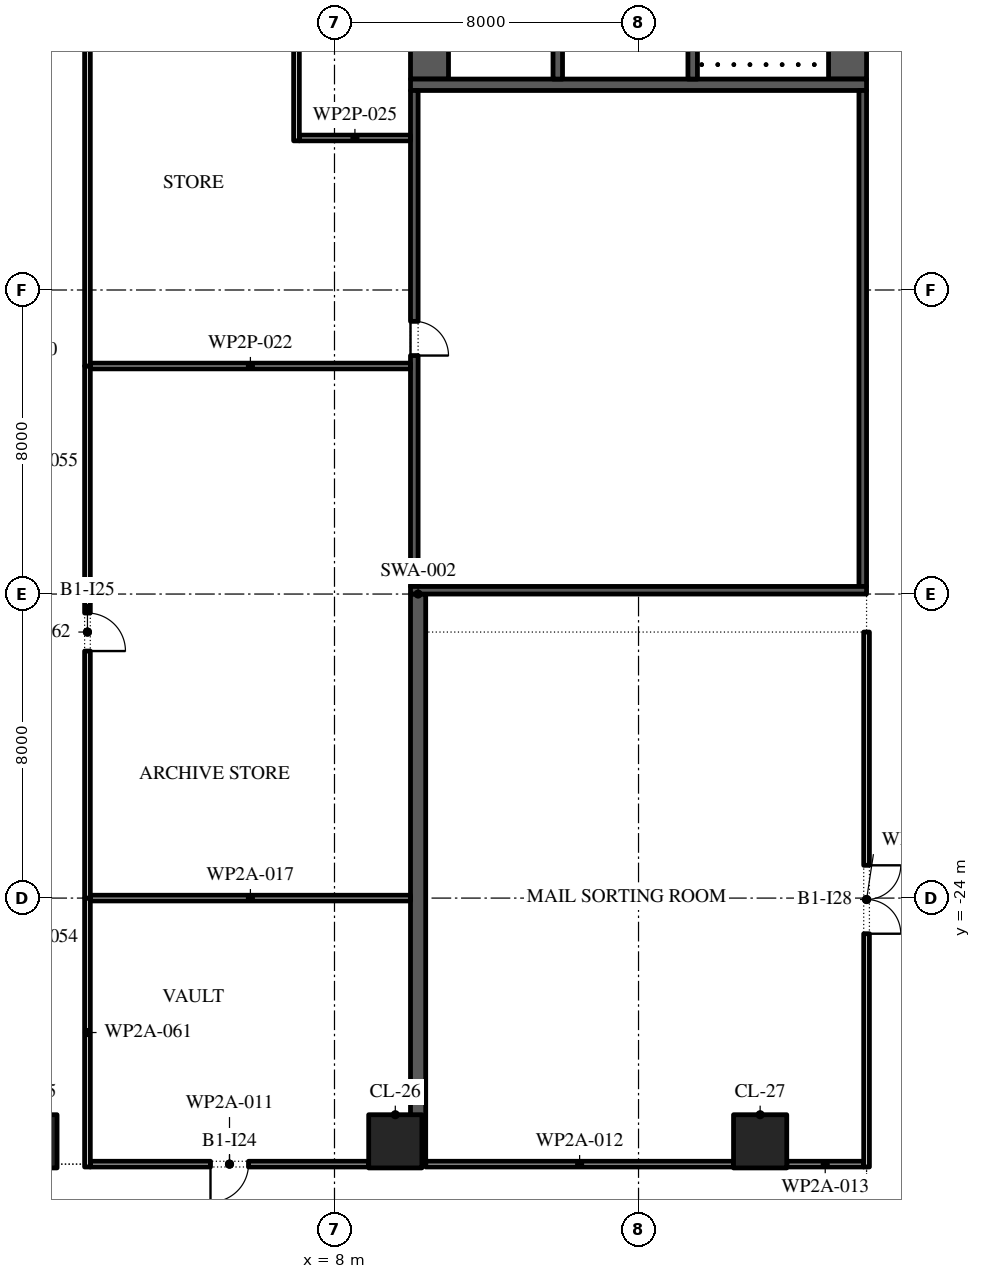
"""IFC4 building model, lengths in metres.
Left out: names, types, materials, properties, quantities, classifications, styles, units other than length and angle.
Written with IfcOpenShell. Run it as: python <this file> out.ifc"""

import sys

from ifc_helpers import new_model, si_unit, direction, frame, frame_2d, origin, origin_2d, place, context, subcontext, project, spatial, rectangle, extrude, element, fill, save


model = new_model("IFC4")
c1 = context("Model", 3, precision=1e-05, world=origin(), true_north=direction((0.0, 1.0)))
c2 = subcontext(c1, "Body", "Model", "MODEL_VIEW")
j1 = project(units=[si_unit("LENGTHUNIT", "METRE"), si_unit("PLANEANGLEUNIT", "RADIAN")], contexts=[c1])
p1 = place(None, origin())
s1 = spatial("IfcSite", under=j1, at=p1, CompositionType="ELEMENT")
p2 = place(p1, origin())
s2 = spatial("IfcBuilding", under=s1, at=p2, CompositionType="ELEMENT")
p3 = place(p2, frame((0.0, 0.0, -5.2)))
s3 = spatial("IfcBuildingStorey", under=s2, at=p3, CompositionType="ELEMENT", Elevation=-5.2)
for number, where, z_axis, x_axis in (
    (1, (0.0, -30.4, 0.0), (0.0, 0.0, 1.0), (1.0, 0.0, 0.0)),
    (2, (9.6, -30.4, 0.0), (0.0, 0.0, 1.0), (1.0, 0.0, 0.0)),
    (3, (19.2, -30.4, 0.0), (0.0, 0.0, 1.0), (1.0, 0.0, 0.0)),
):
    element("IfcColumn", number, at=place(p3, frame(where, z_axis=z_axis, x_axis=x_axis)), inside=s3, PredefinedType="COLUMN", context=c2, shape_type="SweptSolid", body=[
        extrude(rectangle(XDim=1.4, YDim=1.4, at=origin_2d()), origin(), (0.0, 0.0, 1.0), 5.2),
    ])
p4 = place(p3, frame((10.2, -31.0, 0.0), z_axis=(0.0, 0.0, 1.0), x_axis=(0.0, 1.0, 0.0)))
e4 = element("IfcWall", 4, at=p4, inside=s3, PredefinedType="SHEAR", context=c2, shape_type="SweptSolid", body=[
    extrude(rectangle(XDim=15.0, YDim=0.4, at=frame_2d((7.5, 0.0))), origin(), (0.0, 0.0, 1.0), 4.9),
])
p5 = place(p3, frame((21.5, -2.45, 0.0), z_axis=(0.0, 0.0, 1.0), x_axis=(0.0, 1.0, 0.0)))
e5 = element("IfcWall", 5, at=p5, inside=s3, PredefinedType="SHEAR", context=c2, shape_type="SweptSolid", body=[
    extrude(rectangle(XDim=27.9, YDim=1.0, at=frame_2d((13.95, 0.0))), origin(), (0.0, 0.0, 1.0), 4.9),
])
p6 = place(p5, frame((5.05, 0.0, 0.0)))
e6 = element("IfcOpeningElement", 6, at=p6, cuts=e5, PredefinedType="OPENING", context=c2, shape_type="SweptSolid", body=[
    extrude(rectangle(XDim=1.2, YDim=2.1, at=frame_2d((0.6, 1.05))), frame((0.0, 0.51, 0.0), z_axis=(0.0, -1.0, 0.0), x_axis=(1.0, 0.0, 0.0)), (0.0, 0.0, 1.0), 1.02),
])
p7 = place(p5, frame((21.65, 0.0, 0.0)))
e7 = element("IfcOpeningElement", 7, at=p7, cuts=e5, PredefinedType="OPENING", context=c2, shape_type="SweptSolid", body=[
    extrude(rectangle(XDim=1.2, YDim=2.1, at=frame_2d((0.6, 1.05))), frame((0.0, 0.51, 0.0), z_axis=(0.0, -1.0, 0.0), x_axis=(1.0, 0.0, 0.0)), (0.0, 0.0, 1.0), 1.02),
])
p8 = place(p3, frame((10.5, -2.45, 0.0), z_axis=(0.0, 0.0, 1.0), x_axis=(0.0, 1.0, 0.0)))
e8 = element("IfcWall", 8, at=p8, inside=s3, PredefinedType="SHEAR", context=c2, shape_type="SweptSolid", body=[
    extrude(rectangle(XDim=27.9, YDim=1.0, at=frame_2d((13.95, 0.0))), origin(), (0.0, 0.0, 1.0), 4.9),
])
p9 = place(p8, frame((23.65, 0.0, 0.0)))
e9 = element("IfcOpeningElement", 9, at=p9, cuts=e8, PredefinedType="OPENING", context=c2, shape_type="SweptSolid", body=[
    extrude(rectangle(XDim=2.4, YDim=2.1, at=frame_2d((1.2, 1.05))), frame((0.0, 0.51, 0.0), z_axis=(0.0, -1.0, 0.0), x_axis=(1.0, 0.0, 0.0)), (0.0, 0.0, 1.0), 1.02),
])
p10 = place(p8, frame((1.387, 0.0, 0.0)))
e10 = element("IfcOpeningElement", 10, at=p10, cuts=e8, PredefinedType="OPENING", context=c2, shape_type="SweptSolid", body=[
    extrude(rectangle(XDim=0.9, YDim=2.1, at=frame_2d((0.45, 1.05))), frame((0.0, 0.51, 0.0), z_axis=(0.0, -1.0, 0.0), x_axis=(1.0, 0.0, 0.0)), (0.0, 0.0, 1.0), 1.02),
])
p11 = place(p8, frame((4.562, 0.0, 0.0)))
e11 = element("IfcOpeningElement", 11, at=p11, cuts=e8, PredefinedType="OPENING", context=c2, shape_type="SweptSolid", body=[
    extrude(rectangle(XDim=1.0, YDim=2.1, at=frame_2d((0.5, 1.05))), frame((0.0, 0.51, 0.0), z_axis=(0.0, -1.0, 0.0), x_axis=(1.0, 0.0, 0.0)), (0.0, 0.0, 1.0), 1.02),
])
p12 = place(p3, frame((10.0, -2.6, 0.0), z_axis=(0.0, 0.0, 1.0), x_axis=(1.0, 0.0, 0.0)))
e12 = element("IfcWall", 12, at=p12, inside=s3, PredefinedType="SHEAR", context=c2, shape_type="SweptSolid", body=[
    extrude(rectangle(XDim=12.0, YDim=0.3, at=frame_2d((6.0, 0.0))), origin(), (0.0, 0.0, 1.0), 4.9),
])
p13 = place(p3, frame((17.425, -2.45, 0.0), z_axis=(0.0, 0.0, 1.0), x_axis=(0.0, 1.0, 0.0)))
e13 = element("IfcWall", 13, at=p13, inside=s3, PredefinedType="SHEAR", context=c2, shape_type="SweptSolid", body=[
    extrude(rectangle(XDim=6.3, YDim=0.25, at=frame_2d((3.15, 0.0))), origin(), (0.0, 0.0, 1.0), 4.9),
])
p14 = place(p13, frame((5.05, 0.0, 0.0)))
e14 = element("IfcOpeningElement", 14, at=p14, cuts=e13, PredefinedType="OPENING", context=c2, shape_type="SweptSolid", body=[
    extrude(rectangle(XDim=1.2, YDim=2.1, at=frame_2d((0.6, 1.05))), frame((0.0, 0.135, 0.0), z_axis=(0.0, -1.0, 0.0), x_axis=(1.0, 0.0, 0.0)), (0.0, 0.0, 1.0), 0.27),
])
p15 = place(p3, frame((13.875, -2.45, 0.0), z_axis=(0.0, 0.0, 1.0), x_axis=(0.0, 1.0, 0.0)))
e15 = element("IfcWall", 15, at=p15, inside=s3, PredefinedType="SHEAR", context=c2, shape_type="SweptSolid", body=[
    extrude(rectangle(XDim=21.3, YDim=0.25, at=frame_2d((10.65, 0.0))), origin(), (0.0, 0.0, 1.0), 4.9),
])
p16 = place(p15, frame((10.996, 0.0, 0.0)))
e16 = element("IfcOpeningElement", 16, at=p16, cuts=e15, PredefinedType="OPENING", context=c2, shape_type="SweptSolid", body=[
    extrude(rectangle(XDim=1.8, YDim=2.4, at=frame_2d((0.9, 1.2))), frame((0.0, 0.135, 0.0), z_axis=(0.0, -1.0, 0.0), x_axis=(1.0, 0.0, 0.0)), (0.0, 0.0, 1.0), 0.27),
])
p17 = place(p15, frame((17.725, 0.0, 0.0)))
e17 = element("IfcOpeningElement", 17, at=p17, cuts=e15, PredefinedType="OPENING", context=c2, shape_type="SweptSolid", body=[
    extrude(rectangle(XDim=0.9, YDim=2.1, at=frame_2d((0.45, 1.05))), frame((0.0, 0.135, 0.0), z_axis=(0.0, -1.0, 0.0), x_axis=(1.0, 0.0, 0.0)), (0.0, 0.0, 1.0), 0.27),
])
p18 = place(p15, frame((6.971, 0.0, 0.0)))
e18 = element("IfcOpeningElement", 18, at=p18, cuts=e15, PredefinedType="OPENING", context=c2, shape_type="SweptSolid", body=[
    extrude(rectangle(XDim=1.1, YDim=2.1, at=frame_2d((0.55, 1.05))), frame((0.0, 0.135, 0.0), z_axis=(0.0, -1.0, 0.0), x_axis=(1.0, 0.0, 0.0)), (0.0, 0.0, 1.0), 0.27),
])
p19 = place(p3, frame((21.9, -15.8, 0.0), z_axis=(0.0, 0.0, 1.0), x_axis=(0.0, 1.0, 0.0)))
e19 = element("IfcWall", 19, at=p19, inside=s3, PredefinedType="SHEAR", context=c2, shape_type="SweptSolid", body=[
    extrude(rectangle(XDim=13.05, YDim=0.2, at=frame_2d((6.525, 0.0))), origin(), (0.0, 0.0, 1.0), 4.9),
])
p20 = place(p3, frame((10.1, -15.8, 0.0), z_axis=(0.0, 0.0, 1.0), x_axis=(0.0, 1.0, 0.0)))
e20 = element("IfcWall", 20, at=p20, inside=s3, PredefinedType="SHEAR", context=c2, shape_type="SweptSolid", body=[
    extrude(rectangle(XDim=13.05, YDim=0.2, at=frame_2d((6.525, 0.0))), origin(), (0.0, 0.0, 1.0), 4.9),
])
p21 = place(p20, frame((6.075, 0.0, 0.0)))
e21 = element("IfcOpeningElement", 21, at=p21, cuts=e20, PredefinedType="OPENING", context=c2, shape_type="SweptSolid", body=[
    extrude(rectangle(XDim=0.9, YDim=2.1, at=frame_2d((0.45, 1.05))), frame((0.0, 0.11, 0.0), z_axis=(0.0, -1.0, 0.0), x_axis=(1.0, 0.0, 0.0)), (0.0, 0.0, 1.0), 0.22),
])
p22 = place(p3, frame((10.0, -15.9, 0.0), z_axis=(0.0, 0.0, 1.0), x_axis=(1.0, 0.0, 0.0)))
e22 = element("IfcWall", 22, at=p22, inside=s3, PredefinedType="SHEAR", context=c2, shape_type="SweptSolid", body=[
    extrude(rectangle(XDim=12.0, YDim=0.2, at=frame_2d((6.0, 0.0))), origin(), (0.0, 0.0, 1.0), 4.9),
])
p23 = place(p3, frame((1.575, -31.0, 0.0), z_axis=(0.0, 0.0, 1.0), x_axis=(1.0, 0.0, 0.0)))
e23 = element("IfcWall", 23, at=p23, inside=s3, PredefinedType="PARTITIONING", context=c2, shape_type="SweptSolid", body=[
    extrude(rectangle(XDim=7.325, YDim=0.15, at=frame_2d((3.663, 0.0))), origin(), (0.0, 0.0, 1.0), 4.9),
])
p24 = place(p23, frame((3.163, 0.0, 0.0)))
e24 = element("IfcOpeningElement", 24, at=p24, cuts=e23, PredefinedType="OPENING", context=c2, shape_type="SweptSolid", body=[
    extrude(rectangle(XDim=1.0, YDim=2.1, at=frame_2d((0.5, 1.05))), frame((0.0, 0.085, 0.0), z_axis=(0.0, -1.0, 0.0), x_axis=(1.0, 0.0, 0.0)), (0.0, 0.0, 1.0), 0.17),
])
p25 = place(p3, frame((10.4, -31.0, 0.0), z_axis=(0.0, 0.0, 1.0), x_axis=(1.0, 0.0, 0.0)))
e25 = element("IfcWall", 25, at=p25, inside=s3, PredefinedType="PARTITIONING", context=c2, shape_type="SweptSolid", body=[
    extrude(rectangle(XDim=8.1, YDim=0.15, at=frame_2d((4.05, 0.0))), origin(), (0.0, 0.0, 1.0), 4.9),
])
p26 = place(p3, frame((19.9, -31.0, 0.0), z_axis=(0.0, 0.0, 1.0), x_axis=(1.0, 0.0, 0.0)))
e26 = element("IfcWall", 26, at=p26, inside=s3, PredefinedType="PARTITIONING", context=c2, shape_type="SweptSolid", body=[
    extrude(rectangle(XDim=2.025, YDim=0.15, at=frame_2d((1.013, 0.0))), origin(), (0.0, 0.0, 1.0), 4.9),
])
p27 = place(p3, frame((1.575, -24.0, 0.0), z_axis=(0.0, 0.0, 1.0), x_axis=(1.0, 0.0, 0.0)))
e27 = element("IfcWall", 27, at=p27, inside=s3, PredefinedType="PARTITIONING", context=c2, shape_type="SweptSolid", body=[
    extrude(rectangle(XDim=8.425, YDim=0.15, at=frame_2d((4.212, 0.0))), origin(), (0.0, 0.0, 1.0), 4.9),
])
p28 = place(p3, frame((1.575, -10.0, 0.0), z_axis=(0.0, 0.0, 1.0), x_axis=(1.0, 0.0, 0.0)))
e28 = element("IfcWall", 28, at=p28, inside=s3, PredefinedType="PARTITIONING", context=c2, shape_type="SweptSolid", body=[
    extrude(rectangle(XDim=8.425, YDim=0.15, at=frame_2d((4.212, 0.0))), origin(), (0.0, 0.0, 1.0), 3.93),
])
p29 = place(p3, frame((7.075, -4.0, 0.0), z_axis=(0.0, 0.0, 1.0), x_axis=(1.0, 0.0, 0.0)))
e29 = element("IfcWall", 29, at=p29, inside=s3, PredefinedType="PARTITIONING", context=c2, shape_type="SweptSolid", body=[
    extrude(rectangle(XDim=2.925, YDim=0.15, at=frame_2d((1.462, 0.0))), origin(), (0.0, 0.0, 1.0), 3.93),
])
p30 = place(p3, frame((1.5, -31.075, 0.0), z_axis=(0.0, 0.0, 1.0), x_axis=(0.0, 1.0, 0.0)))
e30 = element("IfcWall", 30, at=p30, inside=s3, PredefinedType="PARTITIONING", context=c2, shape_type="SweptSolid", body=[
    extrude(rectangle(XDim=7.075, YDim=0.15, at=frame_2d((3.538, 0.0))), origin(), (0.0, 0.0, 1.0), 4.9),
])
p31 = place(p3, frame((1.5, -24.0, 0.0), z_axis=(0.0, 0.0, 1.0), x_axis=(0.0, 1.0, 0.0)))
e31 = element("IfcWall", 31, at=p31, inside=s3, PredefinedType="PARTITIONING", context=c2, shape_type="SweptSolid", body=[
    extrude(rectangle(XDim=14.0, YDim=0.15, at=frame_2d((7.0, 0.0))), origin(), (0.0, 0.0, 1.0), 4.9),
])
p32 = place(p31, frame((6.5, 0.0, 0.0)))
e32 = element("IfcOpeningElement", 32, at=p32, cuts=e31, PredefinedType="OPENING", context=c2, shape_type="SweptSolid", body=[
    extrude(rectangle(XDim=1.0, YDim=2.1, at=frame_2d((0.5, 1.05))), frame((0.0, 0.085, 0.0), z_axis=(0.0, -1.0, 0.0), x_axis=(1.0, 0.0, 0.0)), (0.0, 0.0, 1.0), 0.17),
])
p33 = place(p3, frame((1.5, -10.0, 0.0), z_axis=(0.0, 0.0, 1.0), x_axis=(0.0, 1.0, 0.0)))
e33 = element("IfcWall", 33, at=p33, inside=s3, PredefinedType="PARTITIONING", context=c2, shape_type="SweptSolid", body=[
    extrude(rectangle(XDim=35.475, YDim=0.15, at=frame_2d((17.738, 0.0))), origin(), (0.0, 0.0, 1.0), 4.9),
])
p34 = place(p33, frame((16.837, 0.0, 0.0)))
e34 = element("IfcOpeningElement", 34, at=p34, cuts=e33, PredefinedType="OPENING", context=c2, shape_type="SweptSolid", body=[
    extrude(rectangle(XDim=1.8, YDim=2.1, at=frame_2d((0.9, 1.05))), frame((0.0, 0.085, 0.0), z_axis=(0.0, -1.0, 0.0), x_axis=(1.0, 0.0, 0.0)), (0.0, 0.0, 1.0), 0.17),
])
p35 = place(p3, frame((7.0, -4.075, 0.0), z_axis=(0.0, 0.0, 1.0), x_axis=(0.0, 1.0, 0.0)))
e35 = element("IfcWall", 35, at=p35, inside=s3, PredefinedType="PARTITIONING", context=c2, shape_type="SweptSolid", body=[
    extrude(rectangle(XDim=29.55, YDim=0.15, at=frame_2d((14.775, 0.0))), origin(), (0.0, 0.0, 1.0), 4.9),
])
p36 = place(p3, frame((22.0, -31.075, 0.0), z_axis=(0.0, 0.0, 1.0), x_axis=(0.0, 1.0, 0.0)))
e36 = element("IfcWall", 36, at=p36, inside=s3, PredefinedType="PARTITIONING", context=c2, shape_type="SweptSolid", body=[
    extrude(rectangle(XDim=14.075, YDim=0.15, at=frame_2d((7.038, 0.0))), origin(), (0.0, 0.0, 1.0), 4.9),
])
p37 = place(p36, frame((6.137, 0.0, 0.0)))
e37 = element("IfcOpeningElement", 37, at=p37, cuts=e36, PredefinedType="OPENING", context=c2, shape_type="SweptSolid", body=[
    extrude(rectangle(XDim=1.8, YDim=2.1, at=frame_2d((0.9, 1.05))), frame((0.0, 0.085, 0.0), z_axis=(0.0, -1.0, 0.0), x_axis=(1.0, 0.0, 0.0)), (0.0, 0.0, 1.0), 0.17),
])
p38 = place(p21, frame((0.9, -0.15, 0.0), z_axis=(0.0, 0.0, 1.0), x_axis=(-1.0, 0.0, 0.0)))
e38 = element("IfcDoor", 38, at=p38, inside=s3, OperationType="SINGLE_SWING_LEFT", PredefinedType="DOOR", context=c2, shape_type="SweptSolid", body=[
    extrude(rectangle(XDim=0.9, YDim=2.1, at=frame_2d((0.45, 1.05))), frame((0.0, -0.05, 0.0), z_axis=(0.0, -1.0, 0.0), x_axis=(1.0, 0.0, 0.0)), (0.0, 0.0, 1.0), 0.05),
])
fill(e21, e38)
p39 = place(p24, frame((1.0, 0.0, 0.0), z_axis=(0.0, 0.0, 1.0), x_axis=(-1.0, 0.0, 0.0)))
e39 = element("IfcDoor", 39, at=p39, inside=s3, OperationType="SINGLE_SWING_LEFT", PredefinedType="DOOR", context=c2, shape_type="SweptSolid", body=[
    extrude(rectangle(XDim=1.0, YDim=2.1, at=frame_2d((0.5, 1.05))), frame((0.0, 0.025, 0.0), z_axis=(0.0, -1.0, 0.0), x_axis=(1.0, 0.0, 0.0)), (0.0, 0.0, 1.0), 0.05),
])
fill(e24, e39)
p40 = place(p32, frame((1.0, 0.0, 0.0), z_axis=(0.0, 0.0, 1.0), x_axis=(-1.0, 0.0, 0.0)))
e40 = element("IfcDoor", 40, at=p40, inside=s3, OperationType="SINGLE_SWING_LEFT", PredefinedType="DOOR", context=c2, shape_type="SweptSolid", body=[
    extrude(rectangle(XDim=1.0, YDim=2.1, at=frame_2d((0.5, 1.05))), frame((0.0, 0.025, 0.0), z_axis=(0.0, -1.0, 0.0), x_axis=(1.0, 0.0, 0.0)), (0.0, 0.0, 1.0), 0.05),
])
fill(e32, e40)
p41 = place(p37, frame((1.8, 0.0, 0.0), z_axis=(0.0, 0.0, 1.0), x_axis=(-1.0, 0.0, 0.0)))
e41 = element("IfcDoor", 41, at=p41, inside=s3, OperationType="SINGLE_SWING_RIGHT", PredefinedType="DOOR", context=c2, shape_type="SweptSolid", body=[
    extrude(rectangle(XDim=1.8, YDim=2.1, at=frame_2d((0.9, 1.05))), frame((0.0, 0.025, 0.0), z_axis=(0.0, -1.0, 0.0), x_axis=(1.0, 0.0, 0.0)), (0.0, 0.0, 1.0), 0.05),
])
fill(e37, e41)
save(model, sys.argv[1])
